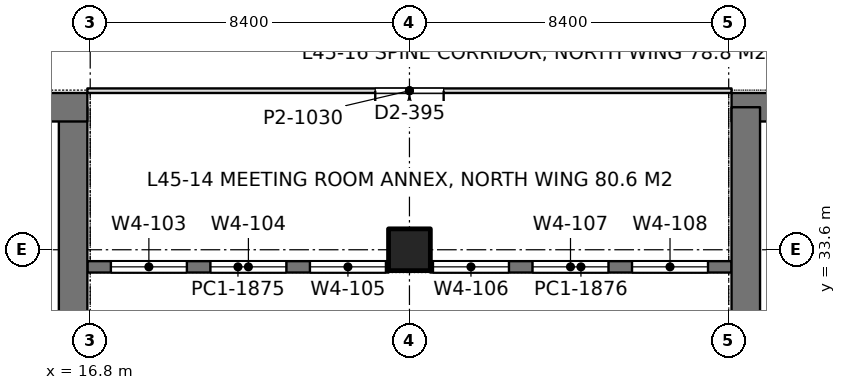
"""IFC4 building model, lengths in metres.
Left out: names, types, materials, properties, quantities, classifications, styles, units other than length and angle.
Written with IfcOpenShell. Run it as: python <this file> out.ifc"""

import sys

from ifc_helpers import new_model, si_unit, direction, frame, frame_2d, origin, origin_2d, place, context, subcontext, project, spatial, rectangle, extrude, element, fill, save


model = new_model("IFC4")
c1 = context("Model", 3, precision=1e-05, world=origin(), true_north=direction((0.0, 1.0)))
c2 = subcontext(c1, "Body", "Model", "MODEL_VIEW")
j1 = project(units=[si_unit("LENGTHUNIT", "METRE"), si_unit("PLANEANGLEUNIT", "RADIAN")], contexts=[c1])
p1 = place(None, origin())
s1 = spatial("IfcSite", under=j1, at=p1, CompositionType="ELEMENT")
p2 = place(p1, origin())
s2 = spatial("IfcBuilding", under=s1, at=p2, CompositionType="ELEMENT")
p3 = place(p2, frame((0.0, 0.0, 198.6)))
s3 = spatial("IfcBuildingStorey", under=s2, at=p3, CompositionType="ELEMENT", Elevation=198.6)
p4 = place(p3, frame((25.2, 33.6, 0.0), z_axis=(0.0, 0.0, 1.0), x_axis=(1.0, 0.0, 0.0)))
e1 = element("IfcColumn", 1, at=p4, inside=s3, PredefinedType="COLUMN", context=c2, shape_type="SweptSolid", body=[
    extrude(rectangle(XDim=1.1, YDim=1.1, at=origin_2d()), origin(), (0.0, 0.0, 1.0), 4.2),
])
p5 = place(p3, frame((-1.125, 37.35, 0.0), z_axis=(0.0, 0.0, 1.0), x_axis=(1.0, 0.0, 0.0)))
e2 = element("IfcWall", 2, at=p5, inside=s3, PredefinedType="SHEAR", context=c2, shape_type="SweptSolid", body=[
    extrude(rectangle(XDim=17.85, YDim=0.75, at=frame_2d((8.925, 0.0))), origin(), (0.0, 0.0, 1.0), 4.2),
])
p6 = place(p5, frame((8.875, 0.0, 0.0)))
e3 = element("IfcOpeningElement", 3, at=p6, cuts=e2, PredefinedType="OPENING", context=c2, shape_type="SweptSolid", body=[
    extrude(rectangle(XDim=1.8, YDim=2.4, at=frame_2d((0.9, 1.2))), frame((0.0, 0.385, 0.0), z_axis=(0.0, -1.0, 0.0), x_axis=(1.0, 0.0, 0.0)), (0.0, 0.0, 1.0), 0.77),
])
p7 = place(p3, frame((16.35, 27.8, 0.0), z_axis=(0.0, 0.0, 1.0), x_axis=(0.0, 1.0, 0.0)))
e4 = element("IfcWall", 4, at=p7, inside=s3, PredefinedType="SHEAR", context=c2, shape_type="SweptSolid", body=[
    extrude(rectangle(XDim=9.55, YDim=0.75, at=frame_2d((4.775, 0.0))), origin(), (0.0, 0.0, 1.0), 4.2),
])
p8 = place(p3, frame((33.675, 37.35, 0.0), z_axis=(0.0, 0.0, 1.0), x_axis=(1.0, 0.0, 0.0)))
e5 = element("IfcWall", 5, at=p8, inside=s3, PredefinedType="SHEAR", context=c2, shape_type="SweptSolid", body=[
    extrude(rectangle(XDim=17.85, YDim=0.75, at=frame_2d((8.925, 0.0))), origin(), (0.0, 0.0, 1.0), 4.2),
])
p9 = place(p8, frame((7.175, 0.0, 0.0)))
e6 = element("IfcOpeningElement", 6, at=p9, cuts=e5, PredefinedType="OPENING", context=c2, shape_type="SweptSolid", body=[
    extrude(rectangle(XDim=1.8, YDim=2.4, at=frame_2d((0.9, 1.2))), frame((0.0, 0.385, 0.0), z_axis=(0.0, -1.0, 0.0), x_axis=(1.0, 0.0, 0.0)), (0.0, 0.0, 1.0), 0.77),
])
p10 = place(p3, frame((34.05, 27.8, 0.0), z_axis=(0.0, 0.0, 1.0), x_axis=(0.0, 1.0, 0.0)))
e7 = element("IfcWall", 7, at=p10, inside=s3, PredefinedType="SHEAR", context=c2, shape_type="SweptSolid", body=[
    extrude(rectangle(XDim=9.55, YDim=0.75, at=frame_2d((4.775, 0.0))), origin(), (0.0, 0.0, 1.0), 4.2),
])
p11 = place(p3, frame((16.725, 33.15, 0.0), z_axis=(0.0, 0.0, 1.0), x_axis=(1.0, 0.0, 0.0)))
e8 = element("IfcWall", 8, at=p11, inside=s3, PredefinedType="SOLIDWALL", context=c2, shape_type="SweptSolid", body=[
    extrude(rectangle(XDim=7.925, YDim=0.3, at=frame_2d((3.962, 0.0))), origin(), (0.0, 0.0, 1.0), 4.05),
])
p12 = place(p11, frame((0.619, 0.0, 0.9)))
e9 = element("IfcOpeningElement", 9, at=p12, cuts=e8, PredefinedType="OPENING", context=c2, shape_type="SweptSolid", body=[
    extrude(rectangle(XDim=2.0, YDim=1.9, at=frame_2d((1.0, 0.95))), frame((0.0, 0.16, 0.0), z_axis=(0.0, -1.0, 0.0), x_axis=(1.0, 0.0, 0.0)), (0.0, 0.0, 1.0), 0.32),
])
p13 = place(p11, frame((3.238, 0.0, 0.9)))
e10 = element("IfcOpeningElement", 10, at=p13, cuts=e8, PredefinedType="OPENING", context=c2, shape_type="SweptSolid", body=[
    extrude(rectangle(XDim=2.0, YDim=1.9, at=frame_2d((1.0, 0.95))), frame((0.0, 0.16, 0.0), z_axis=(0.0, -1.0, 0.0), x_axis=(1.0, 0.0, 0.0)), (0.0, 0.0, 1.0), 0.32),
])
p14 = place(p11, frame((5.856, 0.0, 0.9)))
e11 = element("IfcOpeningElement", 11, at=p14, cuts=e8, PredefinedType="OPENING", context=c2, shape_type="SweptSolid", body=[
    extrude(rectangle(XDim=2.0, YDim=1.9, at=frame_2d((1.0, 0.95))), frame((0.0, 0.16, 0.0), z_axis=(0.0, -1.0, 0.0), x_axis=(1.0, 0.0, 0.0)), (0.0, 0.0, 1.0), 0.32),
])
p15 = place(p3, frame((25.75, 33.15, 0.0), z_axis=(0.0, 0.0, 1.0), x_axis=(1.0, 0.0, 0.0)))
e12 = element("IfcWall", 12, at=p15, inside=s3, PredefinedType="SOLIDWALL", context=c2, shape_type="SweptSolid", body=[
    extrude(rectangle(XDim=7.925, YDim=0.3, at=frame_2d((3.962, 0.0))), origin(), (0.0, 0.0, 1.0), 4.05),
])
p16 = place(p15, frame((0.069, 0.0, 0.9)))
e13 = element("IfcOpeningElement", 13, at=p16, cuts=e12, PredefinedType="OPENING", context=c2, shape_type="SweptSolid", body=[
    extrude(rectangle(XDim=2.0, YDim=1.9, at=frame_2d((1.0, 0.95))), frame((0.0, 0.16, 0.0), z_axis=(0.0, -1.0, 0.0), x_axis=(1.0, 0.0, 0.0)), (0.0, 0.0, 1.0), 0.32),
])
p17 = place(p15, frame((2.688, 0.0, 0.9)))
e14 = element("IfcOpeningElement", 14, at=p17, cuts=e12, PredefinedType="OPENING", context=c2, shape_type="SweptSolid", body=[
    extrude(rectangle(XDim=2.0, YDim=1.9, at=frame_2d((1.0, 0.95))), frame((0.0, 0.16, 0.0), z_axis=(0.0, -1.0, 0.0), x_axis=(1.0, 0.0, 0.0)), (0.0, 0.0, 1.0), 0.32),
])
p18 = place(p15, frame((5.306, 0.0, 0.9)))
e15 = element("IfcOpeningElement", 15, at=p18, cuts=e12, PredefinedType="OPENING", context=c2, shape_type="SweptSolid", body=[
    extrude(rectangle(XDim=2.0, YDim=1.9, at=frame_2d((1.0, 0.95))), frame((0.0, 0.16, 0.0), z_axis=(0.0, -1.0, 0.0), x_axis=(1.0, 0.0, 0.0)), (0.0, 0.0, 1.0), 0.32),
])
p19 = place(p3, frame((16.725, 37.785, 0.0), z_axis=(0.0, 0.0, 1.0), x_axis=(1.0, 0.0, 0.0)))
e16 = element("IfcWall", 16, at=p19, inside=s3, PredefinedType="PARTITIONING", context=c2, shape_type="SweptSolid", body=[
    extrude(rectangle(XDim=16.95, YDim=0.12, at=frame_2d((8.475, 0.0))), origin(), (0.0, 0.0, 1.0), 3.55),
])
p20 = place(p19, frame((7.575, 0.0, 0.0)))
e17 = element("IfcOpeningElement", 17, at=p20, cuts=e16, PredefinedType="OPENING", context=c2, shape_type="SweptSolid", body=[
    extrude(rectangle(XDim=1.8, YDim=2.2, at=frame_2d((0.9, 1.1))), frame((0.0, 0.07, 0.0), z_axis=(0.0, -1.0, 0.0), x_axis=(1.0, 0.0, 0.0)), (0.0, 0.0, 1.0), 0.14),
])
p21 = place(p12, origin())
e18 = element("IfcWindow", 18, at=p21, inside=s3, PartitioningType="SINGLE_PANEL", PredefinedType="WINDOW", context=c2, shape_type="SweptSolid", body=[
    extrude(rectangle(XDim=2.0, YDim=1.9, at=frame_2d((1.0, 0.95))), frame((0.0, 0.03, 0.0), z_axis=(0.0, -1.0, 0.0), x_axis=(1.0, 0.0, 0.0)), (0.0, 0.0, 1.0), 0.06),
])
fill(e9, e18)
p22 = place(p13, origin())
e19 = element("IfcWindow", 19, at=p22, inside=s3, PartitioningType="SINGLE_PANEL", PredefinedType="WINDOW", context=c2, shape_type="SweptSolid", body=[
    extrude(rectangle(XDim=2.0, YDim=1.9, at=frame_2d((1.0, 0.95))), frame((0.0, 0.03, 0.0), z_axis=(0.0, -1.0, 0.0), x_axis=(1.0, 0.0, 0.0)), (0.0, 0.0, 1.0), 0.06),
])
fill(e10, e19)
p23 = place(p14, origin())
e20 = element("IfcWindow", 20, at=p23, inside=s3, PartitioningType="SINGLE_PANEL", PredefinedType="WINDOW", context=c2, shape_type="SweptSolid", body=[
    extrude(rectangle(XDim=2.0, YDim=1.9, at=frame_2d((1.0, 0.95))), frame((0.0, 0.03, 0.0), z_axis=(0.0, -1.0, 0.0), x_axis=(1.0, 0.0, 0.0)), (0.0, 0.0, 1.0), 0.06),
])
fill(e11, e20)
p24 = place(p16, origin())
e21 = element("IfcWindow", 21, at=p24, inside=s3, PartitioningType="SINGLE_PANEL", PredefinedType="WINDOW", context=c2, shape_type="SweptSolid", body=[
    extrude(rectangle(XDim=2.0, YDim=1.9, at=frame_2d((1.0, 0.95))), frame((0.0, 0.03, 0.0), z_axis=(0.0, -1.0, 0.0), x_axis=(1.0, 0.0, 0.0)), (0.0, 0.0, 1.0), 0.06),
])
fill(e13, e21)
p25 = place(p17, origin())
e22 = element("IfcWindow", 22, at=p25, inside=s3, PartitioningType="SINGLE_PANEL", PredefinedType="WINDOW", context=c2, shape_type="SweptSolid", body=[
    extrude(rectangle(XDim=2.0, YDim=1.9, at=frame_2d((1.0, 0.95))), frame((0.0, 0.03, 0.0), z_axis=(0.0, -1.0, 0.0), x_axis=(1.0, 0.0, 0.0)), (0.0, 0.0, 1.0), 0.06),
])
fill(e14, e22)
p26 = place(p18, origin())
e23 = element("IfcWindow", 23, at=p26, inside=s3, PartitioningType="SINGLE_PANEL", PredefinedType="WINDOW", context=c2, shape_type="SweptSolid", body=[
    extrude(rectangle(XDim=2.0, YDim=1.9, at=frame_2d((1.0, 0.95))), frame((0.0, 0.03, 0.0), z_axis=(0.0, -1.0, 0.0), x_axis=(1.0, 0.0, 0.0)), (0.0, 0.0, 1.0), 0.06),
])
fill(e15, e23)
p27 = place(p20, frame((1.8, 0.0, 0.0), z_axis=(0.0, 0.0, 1.0), x_axis=(-1.0, 0.0, 0.0)))
e24 = element("IfcDoor", 24, at=p27, inside=s3, OperationType="DOUBLE_DOOR_SINGLE_SWING", PredefinedType="DOOR", context=c2, shape_type="SweptSolid", body=[
    extrude(rectangle(XDim=1.8, YDim=2.2, at=frame_2d((0.9, 1.1))), frame((0.0, 0.025, 0.0), z_axis=(0.0, -1.0, 0.0), x_axis=(1.0, 0.0, 0.0)), (0.0, 0.0, 1.0), 0.05),
])
fill(e17, e24)
save(model, sys.argv[1])
